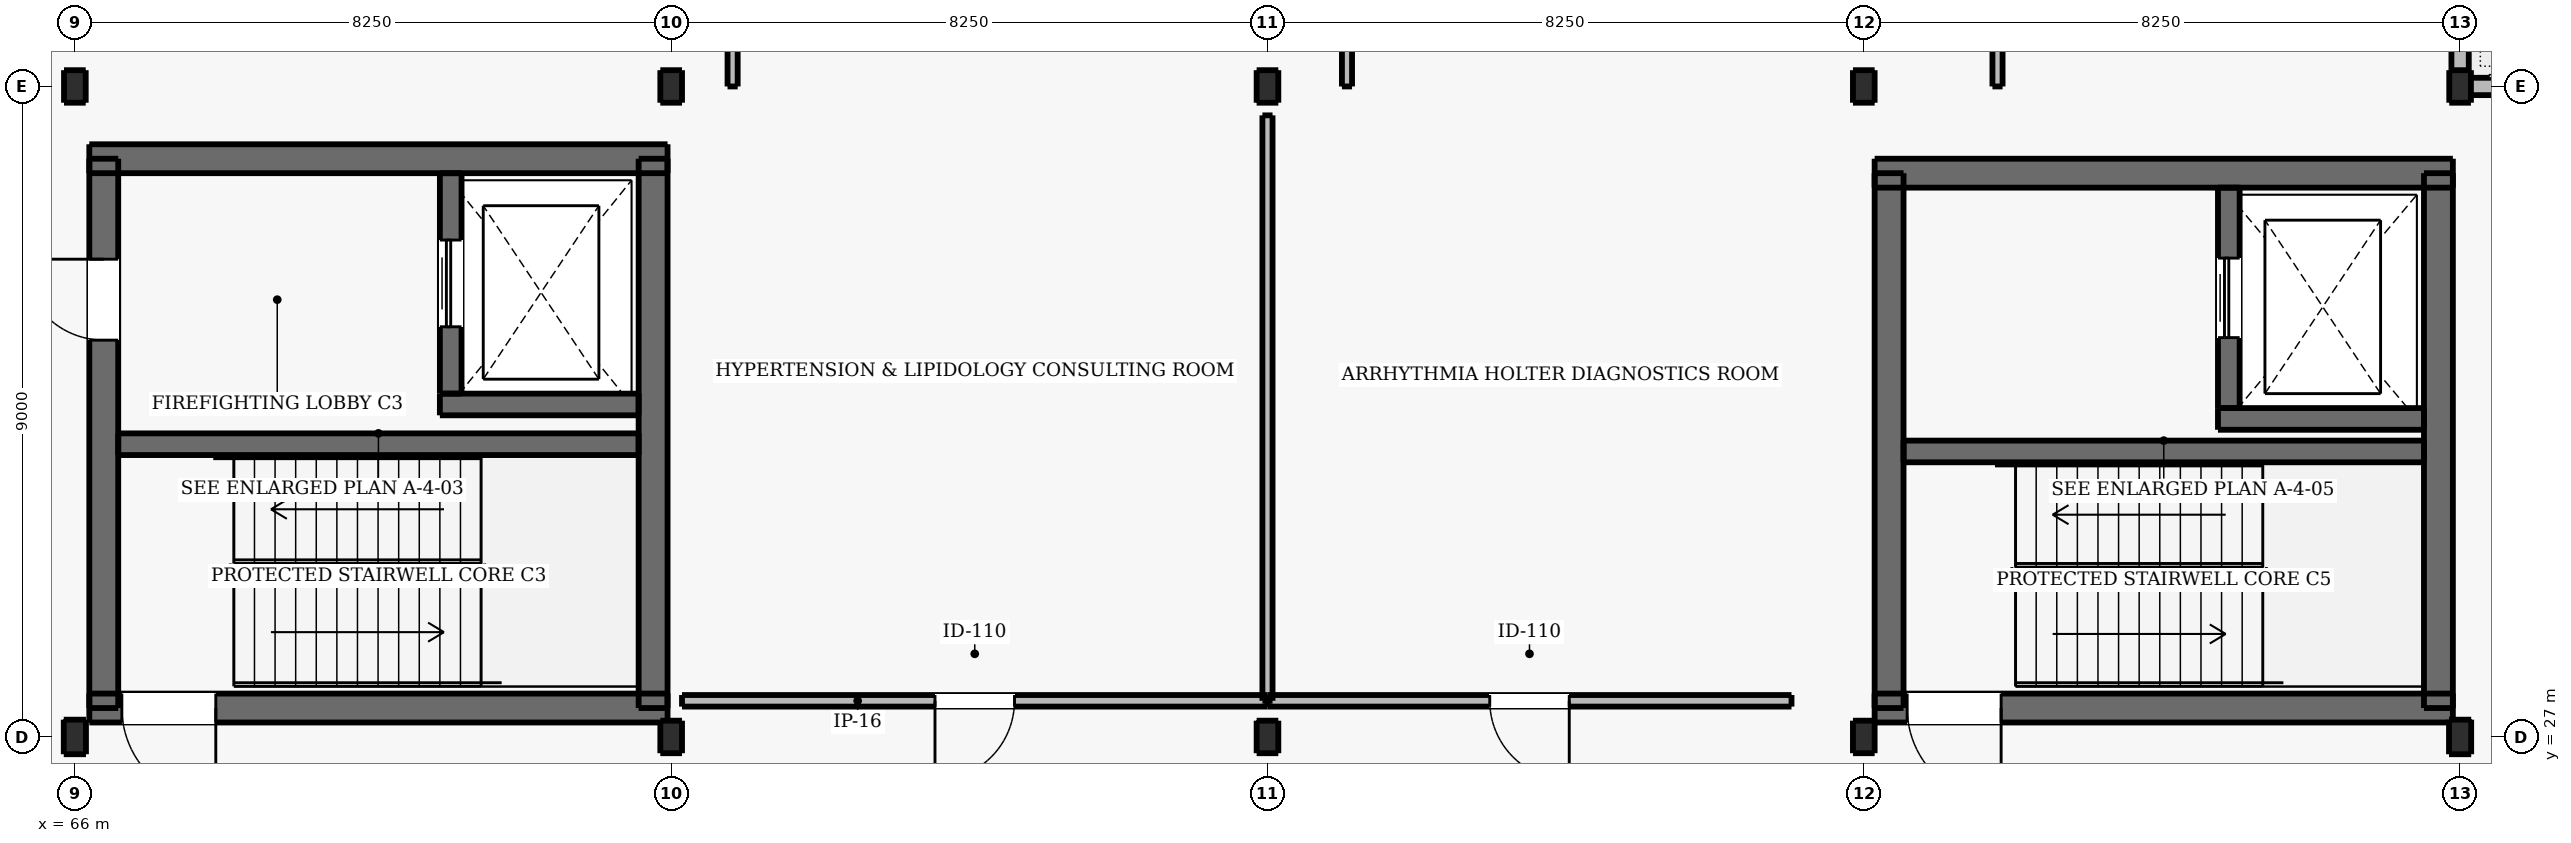
"""IFC4 building model, lengths in metres.
Left out: names, types, materials, properties, quantities, classifications, styles, units other than length and angle.
Written with IfcOpenShell. Run it as: python <this file> out.ifc"""

import sys

from ifc_helpers import new_model, si_unit, direction, frame, frame_2d, origin, origin_2d, place, context, subcontext, project, spatial, rectangle, i_section, extrude, element, fill, save


model = new_model("IFC4")
c1 = context("Model", 3, precision=1e-05, world=origin(), true_north=direction((0.0, 1.0)))
c2 = subcontext(c1, "Body", "Model", "MODEL_VIEW")
j1 = project(units=[si_unit("LENGTHUNIT", "METRE"), si_unit("PLANEANGLEUNIT", "RADIAN")], contexts=[c1])
p1 = place(None, origin())
s1 = spatial("IfcSite", under=j1, at=p1, CompositionType="ELEMENT")
p2 = place(p1, origin())
s2 = spatial("IfcBuilding", under=s1, at=p2, CompositionType="ELEMENT")
p3 = place(p2, frame((0.0, 0.0, 5.1)))
s3 = spatial("IfcBuildingStorey", under=s2, at=p3, CompositionType="ELEMENT", Elevation=5.1)
p4 = place(p3, frame((66.0, 27.0, 0.0), z_axis=(0.0, 0.0, 1.0), x_axis=(1.0, 0.0, 0.0)))
e1 = element("IfcColumn", 1, at=p4, inside=s3, PredefinedType="COLUMN", context=c2, shape_type="SweptSolid", body=[
    extrude(i_section(OverallWidth=0.307, OverallDepth=0.478, WebThickness=0.021, FlangeThickness=0.04, FilletRadius=0.027, at=origin_2d()), origin(), (0.0, 0.0, 1.0), 4.5),
])
for number, where, z_axis, x_axis in (
    (2, (66.0, 36.0, 0.0), (0.0, 0.0, 1.0), (1.0, 0.0, 0.0)),
    (3, (74.25, 27.0, 0.0), (0.0, 0.0, 1.0), (1.0, 0.0, 0.0)),
    (4, (74.25, 36.0, 0.0), (0.0, 0.0, 1.0), (1.0, 0.0, 0.0)),
    (5, (82.5, 27.0, 0.0), (0.0, 0.0, 1.0), (1.0, 0.0, 0.0)),
    (6, (82.5, 36.0, 0.0), (0.0, 0.0, 1.0), (1.0, 0.0, 0.0)),
    (7, (90.75, 27.0, 0.0), (0.0, 0.0, 1.0), (1.0, 0.0, 0.0)),
    (8, (90.75, 36.0, 0.0), (0.0, 0.0, 1.0), (1.0, 0.0, 0.0)),
):
    element("IfcColumn", number, at=place(p3, frame(where, z_axis=z_axis, x_axis=x_axis)), inside=s3, PredefinedType="COLUMN", context=c2, shape_type="SweptSolid", body=[
        extrude(i_section(OverallWidth=0.3, OverallDepth=0.45, WebThickness=0.014, FlangeThickness=0.026, FilletRadius=0.027, at=origin_2d()), origin(), (0.0, 0.0, 1.0), 4.5),
    ])
p5 = place(p3, frame((99.0, 27.0, 0.0), z_axis=(0.0, 0.0, 1.0), x_axis=(1.0, 0.0, 0.0)))
e9 = element("IfcColumn", 9, at=p5, inside=s3, PredefinedType="COLUMN", context=c2, shape_type="SweptSolid", body=[
    extrude(i_section(OverallWidth=0.307, OverallDepth=0.478, WebThickness=0.021, FlangeThickness=0.04, FilletRadius=0.027, at=origin_2d()), origin(), (0.0, 0.0, 1.0), 4.5),
])
p6 = place(p3, frame((99.0, 36.0, 0.0), z_axis=(0.0, 0.0, 1.0), x_axis=(1.0, 0.0, 0.0)))
e10 = element("IfcColumn", 10, at=p6, inside=s3, PredefinedType="COLUMN", context=c2, shape_type="SweptSolid", body=[
    extrude(i_section(OverallWidth=0.3, OverallDepth=0.45, WebThickness=0.014, FlangeThickness=0.026, FilletRadius=0.027, at=origin_2d()), origin(), (0.0, 0.0, 1.0), 4.5),
])
p7 = place(p3, frame((66.2, 27.4, 0.0), z_axis=(0.0, 0.0, 1.0), x_axis=(1.0, 0.0, 0.0)))
e11 = element("IfcWall", 11, at=p7, inside=s3, PredefinedType="SHEAR", context=c2, shape_type="SweptSolid", body=[
    extrude(rectangle(XDim=8.0, YDim=0.4, at=frame_2d((4.0, 0.0))), origin(), (0.0, 0.0, 1.0), 4.5),
])
p8 = place(p7, frame((0.45, 0.0, 0.0)))
e12 = element("IfcOpeningElement", 12, at=p8, cuts=e11, PredefinedType="OPENING", context=c2, shape_type="SweptSolid", body=[
    extrude(rectangle(XDim=1.3, YDim=2.15, at=frame_2d((0.65, 1.075))), frame((0.0, 0.21, 0.0), z_axis=(0.0, -1.0, 0.0), x_axis=(1.0, 0.0, 0.0)), (0.0, 0.0, 1.0), 0.42),
])
p9 = place(p3, frame((66.2, 35.0, 0.0), z_axis=(0.0, 0.0, 1.0), x_axis=(1.0, 0.0, 0.0)))
e13 = element("IfcWall", 13, at=p9, inside=s3, PredefinedType="SHEAR", context=c2, shape_type="SweptSolid", body=[
    extrude(rectangle(XDim=8.0, YDim=0.4, at=frame_2d((4.0, 0.0))), origin(), (0.0, 0.0, 1.0), 4.5),
])
p10 = place(p3, frame((66.4, 27.4, 0.0), z_axis=(0.0, 0.0, 1.0), x_axis=(0.0, 1.0, 0.0)))
e14 = element("IfcWall", 14, at=p10, inside=s3, PredefinedType="SHEAR", context=c2, shape_type="SweptSolid", body=[
    extrude(rectangle(XDim=7.6, YDim=0.4, at=frame_2d((3.8, 0.0))), origin(), (0.0, 0.0, 1.0), 4.5),
])
p11 = place(p10, frame((5.09, 0.0, 0.0)))
e15 = element("IfcOpeningElement", 15, at=p11, cuts=e14, PredefinedType="OPENING", context=c2, shape_type="SweptSolid", body=[
    extrude(rectangle(XDim=1.12, YDim=2.15, at=frame_2d((0.56, 1.075))), frame((0.0, 0.21, 0.0), z_axis=(0.0, -1.0, 0.0), x_axis=(1.0, 0.0, 0.0)), (0.0, 0.0, 1.0), 0.42),
])
p12 = place(p3, frame((74.0, 27.4, 0.0), z_axis=(0.0, 0.0, 1.0), x_axis=(0.0, 1.0, 0.0)))
e16 = element("IfcWall", 16, at=p12, inside=s3, PredefinedType="SHEAR", context=c2, shape_type="SweptSolid", body=[
    extrude(rectangle(XDim=7.6, YDim=0.4, at=frame_2d((3.8, 0.0))), origin(), (0.0, 0.0, 1.0), 4.5),
])
p13 = place(p3, frame((66.6, 31.05, 0.0), z_axis=(0.0, 0.0, 1.0), x_axis=(1.0, 0.0, 0.0)))
e17 = element("IfcWall", 17, at=p13, inside=s3, PredefinedType="SHEAR", context=c2, shape_type="SweptSolid", body=[
    extrude(rectangle(XDim=7.2, YDim=0.3, at=frame_2d((3.6, 0.0))), origin(), (0.0, 0.0, 1.0), 4.5),
])
p14 = place(p3, frame((71.05, 31.6, 0.0), z_axis=(0.0, 0.0, 1.0), x_axis=(1.0, 0.0, 0.0)))
e18 = element("IfcWall", 18, at=p14, inside=s3, PredefinedType="SHEAR", context=c2, shape_type="SweptSolid", body=[
    extrude(rectangle(XDim=2.75, YDim=0.3, at=frame_2d((1.375, 0.0))), origin(), (0.0, 0.0, 1.0), 4.5),
])
p15 = place(p3, frame((71.2, 31.75, 0.0), z_axis=(0.0, 0.0, 1.0), x_axis=(0.0, 1.0, 0.0)))
e19 = element("IfcWall", 19, at=p15, inside=s3, PredefinedType="SHEAR", context=c2, shape_type="SweptSolid", body=[
    extrude(rectangle(XDim=3.05, YDim=0.3, at=frame_2d((1.525, 0.0))), origin(), (0.0, 0.0, 1.0), 4.5),
])
p16 = place(p15, frame((0.925, 0.0, 0.0)))
e20 = element("IfcOpeningElement", 20, at=p16, cuts=e19, PredefinedType="OPENING", context=c2, shape_type="SweptSolid", body=[
    extrude(rectangle(XDim=1.2, YDim=2.15, at=frame_2d((0.6, 1.075))), frame((0.0, 0.16, 0.0), z_axis=(0.0, -1.0, 0.0), x_axis=(1.0, 0.0, 0.0)), (0.0, 0.0, 1.0), 0.32),
])
p17 = place(p3, frame((90.9, 27.4, 0.0), z_axis=(0.0, 0.0, 1.0), x_axis=(1.0, 0.0, 0.0)))
e21 = element("IfcWall", 21, at=p17, inside=s3, PredefinedType="SHEAR", context=c2, shape_type="SweptSolid", body=[
    extrude(rectangle(XDim=8.0, YDim=0.4, at=frame_2d((4.0, 0.0))), origin(), (0.0, 0.0, 1.0), 4.5),
])
p18 = place(p17, frame((0.45, 0.0, 0.0)))
e22 = element("IfcOpeningElement", 22, at=p18, cuts=e21, PredefinedType="OPENING", context=c2, shape_type="SweptSolid", body=[
    extrude(rectangle(XDim=1.3, YDim=2.15, at=frame_2d((0.65, 1.075))), frame((0.0, 0.21, 0.0), z_axis=(0.0, -1.0, 0.0), x_axis=(1.0, 0.0, 0.0)), (0.0, 0.0, 1.0), 0.42),
])
p19 = place(p3, frame((90.9, 34.8, 0.0), z_axis=(0.0, 0.0, 1.0), x_axis=(1.0, 0.0, 0.0)))
e23 = element("IfcWall", 23, at=p19, inside=s3, PredefinedType="SHEAR", context=c2, shape_type="SweptSolid", body=[
    extrude(rectangle(XDim=8.0, YDim=0.4, at=frame_2d((4.0, 0.0))), origin(), (0.0, 0.0, 1.0), 4.5),
])
for number, where, z_axis, x_axis in (
    (24, (91.1, 27.4, 0.0), (0.0, 0.0, 1.0), (0.0, 1.0, 0.0)),
    (25, (98.7, 27.4, 0.0), (0.0, 0.0, 1.0), (0.0, 1.0, 0.0)),
):
    element("IfcWall", number, at=place(p3, frame(where, z_axis=z_axis, x_axis=x_axis)), inside=s3, PredefinedType="SHEAR", context=c2, shape_type="SweptSolid", body=[
        extrude(rectangle(XDim=7.4, YDim=0.4, at=frame_2d((3.7, 0.0))), origin(), (0.0, 0.0, 1.0), 4.5),
    ])
p20 = place(p3, frame((91.3, 30.95, 0.0), z_axis=(0.0, 0.0, 1.0), x_axis=(1.0, 0.0, 0.0)))
e26 = element("IfcWall", 26, at=p20, inside=s3, PredefinedType="SHEAR", context=c2, shape_type="SweptSolid", body=[
    extrude(rectangle(XDim=7.2, YDim=0.3, at=frame_2d((3.6, 0.0))), origin(), (0.0, 0.0, 1.0), 4.5),
])
p21 = place(p3, frame((95.65, 31.4, 0.0), z_axis=(0.0, 0.0, 1.0), x_axis=(1.0, 0.0, 0.0)))
e27 = element("IfcWall", 27, at=p21, inside=s3, PredefinedType="SHEAR", context=c2, shape_type="SweptSolid", body=[
    extrude(rectangle(XDim=2.85, YDim=0.3, at=frame_2d((1.425, 0.0))), origin(), (0.0, 0.0, 1.0), 4.5),
])
p22 = place(p3, frame((95.8, 31.55, 0.0), z_axis=(0.0, 0.0, 1.0), x_axis=(0.0, 1.0, 0.0)))
e28 = element("IfcWall", 28, at=p22, inside=s3, PredefinedType="SHEAR", context=c2, shape_type="SweptSolid", body=[
    extrude(rectangle(XDim=3.05, YDim=0.3, at=frame_2d((1.525, 0.0))), origin(), (0.0, 0.0, 1.0), 4.5),
])
p23 = place(p22, frame((0.975, 0.0, 0.0)))
e29 = element("IfcOpeningElement", 29, at=p23, cuts=e28, PredefinedType="OPENING", context=c2, shape_type="SweptSolid", body=[
    extrude(rectangle(XDim=1.1, YDim=2.15, at=frame_2d((0.55, 1.075))), frame((0.0, 0.16, 0.0), z_axis=(0.0, -1.0, 0.0), x_axis=(1.0, 0.0, 0.0)), (0.0, 0.0, 1.0), 0.32),
])
p24 = place(p3, frame((99.0, 45.0, 0.0), z_axis=(0.0, 0.0, 1.0), x_axis=(0.0, -1.0, 0.0)))
e30 = element("IfcWall", 30, at=p24, inside=s3, PredefinedType="SOLIDWALL", context=c2, shape_type="SweptSolid", body=[
    extrude(rectangle(XDim=9.0, YDim=0.24, at=frame_2d((4.5, 0.0))), origin(), (0.0, 0.0, 1.0), 3.68),
])
p25 = place(p24, frame((1.275, 0.0, 0.95)))
e31 = element("IfcOpeningElement", 31, at=p25, cuts=e30, PredefinedType="OPENING", context=c2, shape_type="SweptSolid", body=[
    extrude(rectangle(XDim=1.95, YDim=1.65, at=frame_2d((0.975, 0.825))), frame((0.0, 0.13, 0.0), z_axis=(0.0, -1.0, 0.0), x_axis=(1.0, 0.0, 0.0)), (0.0, 0.0, 1.0), 0.26),
])
p26 = place(p24, frame((5.775, 0.0, 0.95)))
e32 = element("IfcOpeningElement", 32, at=p26, cuts=e30, PredefinedType="OPENING", context=c2, shape_type="SweptSolid", body=[
    extrude(rectangle(XDim=1.95, YDim=1.65, at=frame_2d((0.975, 0.825))), frame((0.0, 0.13, 0.0), z_axis=(0.0, -1.0, 0.0), x_axis=(1.0, 0.0, 0.0)), (0.0, 0.0, 1.0), 0.26),
])
p27 = place(p3, frame((99.0, 36.0, 0.0), z_axis=(0.0, 0.0, 1.0), x_axis=(1.0, 0.0, 0.0)))
e33 = element("IfcWall", 33, at=p27, inside=s3, PredefinedType="SOLIDWALL", context=c2, shape_type="SweptSolid", body=[
    extrude(rectangle(XDim=12.0, YDim=0.24, at=frame_2d((6.0, 0.0))), origin(), (0.0, 0.0, 1.0), 3.78),
])
p28 = place(p27, frame((1.95, 0.0, 0.95)))
e34 = element("IfcOpeningElement", 34, at=p28, cuts=e33, PredefinedType="OPENING", context=c2, shape_type="SweptSolid", body=[
    extrude(rectangle(XDim=2.1, YDim=1.7, at=frame_2d((1.05, 0.85))), frame((0.0, 0.13, 0.0), z_axis=(0.0, -1.0, 0.0), x_axis=(1.0, 0.0, 0.0)), (0.0, 0.0, 1.0), 0.26),
])
p29 = place(p27, frame((7.95, 0.0, 0.95)))
e35 = element("IfcOpeningElement", 35, at=p29, cuts=e33, PredefinedType="OPENING", context=c2, shape_type="SweptSolid", body=[
    extrude(rectangle(XDim=2.1, YDim=1.7, at=frame_2d((1.05, 0.85))), frame((0.0, 0.13, 0.0), z_axis=(0.0, -1.0, 0.0), x_axis=(1.0, 0.0, 0.0)), (0.0, 0.0, 1.0), 0.26),
])
for number, where, z_axis, x_axis in (
    (36, (75.1, 36.0, 0.0), (0.0, 0.0, 1.0), (0.0, 1.0, 0.0)),
    (37, (83.6, 36.0, 0.0), (0.0, 0.0, 1.0), (0.0, 1.0, 0.0)),
    (38, (92.6, 36.0, 0.0), (0.0, 0.0, 1.0), (0.0, 1.0, 0.0)),
):
    element("IfcWall", number, at=place(p3, frame(where, z_axis=z_axis, x_axis=x_axis)), inside=s3, PredefinedType="PARTITIONING", context=c2, shape_type="SweptSolid", body=[
        extrude(rectangle(XDim=9.0, YDim=0.14, at=frame_2d((4.5, 0.0))), origin(), (0.0, 0.0, 1.0), 4.21),
    ])
p30 = place(p3, frame((74.4, 27.5, 0.0), z_axis=(0.0, 0.0, 1.0), x_axis=(1.0, 0.0, 0.0)))
e39 = element("IfcWall", 39, at=p30, inside=s3, PredefinedType="PARTITIONING", context=c2, shape_type="SweptSolid", body=[
    extrude(rectangle(XDim=8.1, YDim=0.16, at=frame_2d((4.05, 0.0))), origin(), (0.0, 0.0, 1.0), 4.21),
])
p31 = place(p30, frame((3.5, 0.0, 0.0)))
e40 = element("IfcOpeningElement", 40, at=p31, cuts=e39, PredefinedType="OPENING", context=c2, shape_type="SweptSolid", body=[
    extrude(rectangle(XDim=1.1, YDim=2.15, at=frame_2d((0.55, 1.075))), frame((0.0, 0.09, 0.0), z_axis=(0.0, -1.0, 0.0), x_axis=(1.0, 0.0, 0.0)), (0.0, 0.0, 1.0), 0.18),
])
p32 = place(p3, frame((82.5, 27.5, 0.0), z_axis=(0.0, 0.0, 1.0), x_axis=(0.0, 1.0, 0.0)))
e41 = element("IfcWall", 41, at=p32, inside=s3, PredefinedType="PARTITIONING", context=c2, shape_type="SweptSolid", body=[
    extrude(rectangle(XDim=8.1, YDim=0.14, at=frame_2d((4.05, 0.0))), origin(), (0.0, 0.0, 1.0), 3.68),
])
p33 = place(p3, frame((82.5, 27.5, 0.0), z_axis=(0.0, 0.0, 1.0), x_axis=(1.0, 0.0, 0.0)))
e42 = element("IfcWall", 42, at=p33, inside=s3, PredefinedType="PARTITIONING", context=c2, shape_type="SweptSolid", body=[
    extrude(rectangle(XDim=7.25, YDim=0.16, at=frame_2d((3.625, 0.0))), origin(), (0.0, 0.0, 1.0), 4.21),
])
p34 = place(p33, frame((3.075, 0.0, 0.0)))
e43 = element("IfcOpeningElement", 43, at=p34, cuts=e42, PredefinedType="OPENING", context=c2, shape_type="SweptSolid", body=[
    extrude(rectangle(XDim=1.1, YDim=2.15, at=frame_2d((0.55, 1.075))), frame((0.0, 0.09, 0.0), z_axis=(0.0, -1.0, 0.0), x_axis=(1.0, 0.0, 0.0)), (0.0, 0.0, 1.0), 0.18),
])
p35 = place(p16, origin())
e44 = element("IfcDoor", 44, at=p35, inside=s3, OperationType="DOUBLE_DOOR_SLIDING", PredefinedType="DOOR", context=c2, shape_type="SweptSolid", body=[
    extrude(rectangle(XDim=1.2, YDim=2.15, at=frame_2d((0.6, 1.075))), frame((0.0, 0.025, 0.0), z_axis=(0.0, -1.0, 0.0), x_axis=(1.0, 0.0, 0.0)), (0.0, 0.0, 1.0), 0.05),
])
fill(e20, e44)
p36 = place(p11, origin())
e45 = element("IfcDoor", 45, at=p36, inside=s3, OperationType="SINGLE_SWING_RIGHT", PredefinedType="DOOR", context=c2, shape_type="SweptSolid", body=[
    extrude(rectangle(XDim=1.12, YDim=2.15, at=frame_2d((0.56, 1.075))), frame((0.0, 0.025, 0.0), z_axis=(0.0, -1.0, 0.0), x_axis=(1.0, 0.0, 0.0)), (0.0, 0.0, 1.0), 0.05),
])
fill(e15, e45)
p37 = place(p8, frame((1.3, 0.0, 0.0), z_axis=(0.0, 0.0, 1.0), x_axis=(-1.0, 0.0, 0.0)))
e46 = element("IfcDoor", 46, at=p37, inside=s3, OperationType="SINGLE_SWING_RIGHT", PredefinedType="DOOR", context=c2, shape_type="SweptSolid", body=[
    extrude(rectangle(XDim=1.3, YDim=2.15, at=frame_2d((0.65, 1.075))), frame((0.0, 0.025, 0.0), z_axis=(0.0, -1.0, 0.0), x_axis=(1.0, 0.0, 0.0)), (0.0, 0.0, 1.0), 0.05),
])
fill(e12, e46)
p38 = place(p23, origin())
e47 = element("IfcDoor", 47, at=p38, inside=s3, OperationType="DOUBLE_DOOR_SLIDING", PredefinedType="DOOR", context=c2, shape_type="SweptSolid", body=[
    extrude(rectangle(XDim=1.1, YDim=2.15, at=frame_2d((0.55, 1.075))), frame((0.0, 0.025, 0.0), z_axis=(0.0, -1.0, 0.0), x_axis=(1.0, 0.0, 0.0)), (0.0, 0.0, 1.0), 0.05),
])
fill(e29, e47)
p39 = place(p18, frame((1.3, 0.0, 0.0), z_axis=(0.0, 0.0, 1.0), x_axis=(-1.0, 0.0, 0.0)))
e48 = element("IfcDoor", 48, at=p39, inside=s3, OperationType="SINGLE_SWING_RIGHT", PredefinedType="DOOR", context=c2, shape_type="SweptSolid", body=[
    extrude(rectangle(XDim=1.3, YDim=2.15, at=frame_2d((0.65, 1.075))), frame((0.0, 0.025, 0.0), z_axis=(0.0, -1.0, 0.0), x_axis=(1.0, 0.0, 0.0)), (0.0, 0.0, 1.0), 0.05),
])
fill(e22, e48)
p40 = place(p31, frame((1.1, 0.0, 0.0), z_axis=(0.0, 0.0, 1.0), x_axis=(-1.0, 0.0, 0.0)))
e49 = element("IfcDoor", 49, at=p40, inside=s3, OperationType="SINGLE_SWING_LEFT", PredefinedType="DOOR", context=c2, shape_type="SweptSolid", body=[
    extrude(rectangle(XDim=1.1, YDim=2.15, at=frame_2d((0.55, 1.075))), frame((0.0, 0.025, 0.0), z_axis=(0.0, -1.0, 0.0), x_axis=(1.0, 0.0, 0.0)), (0.0, 0.0, 1.0), 0.05),
])
fill(e40, e49)
p41 = place(p34, frame((1.1, 0.0, 0.0), z_axis=(0.0, 0.0, 1.0), x_axis=(-1.0, 0.0, 0.0)))
e50 = element("IfcDoor", 50, at=p41, inside=s3, OperationType="SINGLE_SWING_RIGHT", PredefinedType="DOOR", context=c2, shape_type="SweptSolid", body=[
    extrude(rectangle(XDim=1.1, YDim=2.15, at=frame_2d((0.55, 1.075))), frame((0.0, 0.025, 0.0), z_axis=(0.0, -1.0, 0.0), x_axis=(1.0, 0.0, 0.0)), (0.0, 0.0, 1.0), 0.05),
])
fill(e43, e50)
save(model, sys.argv[1])
